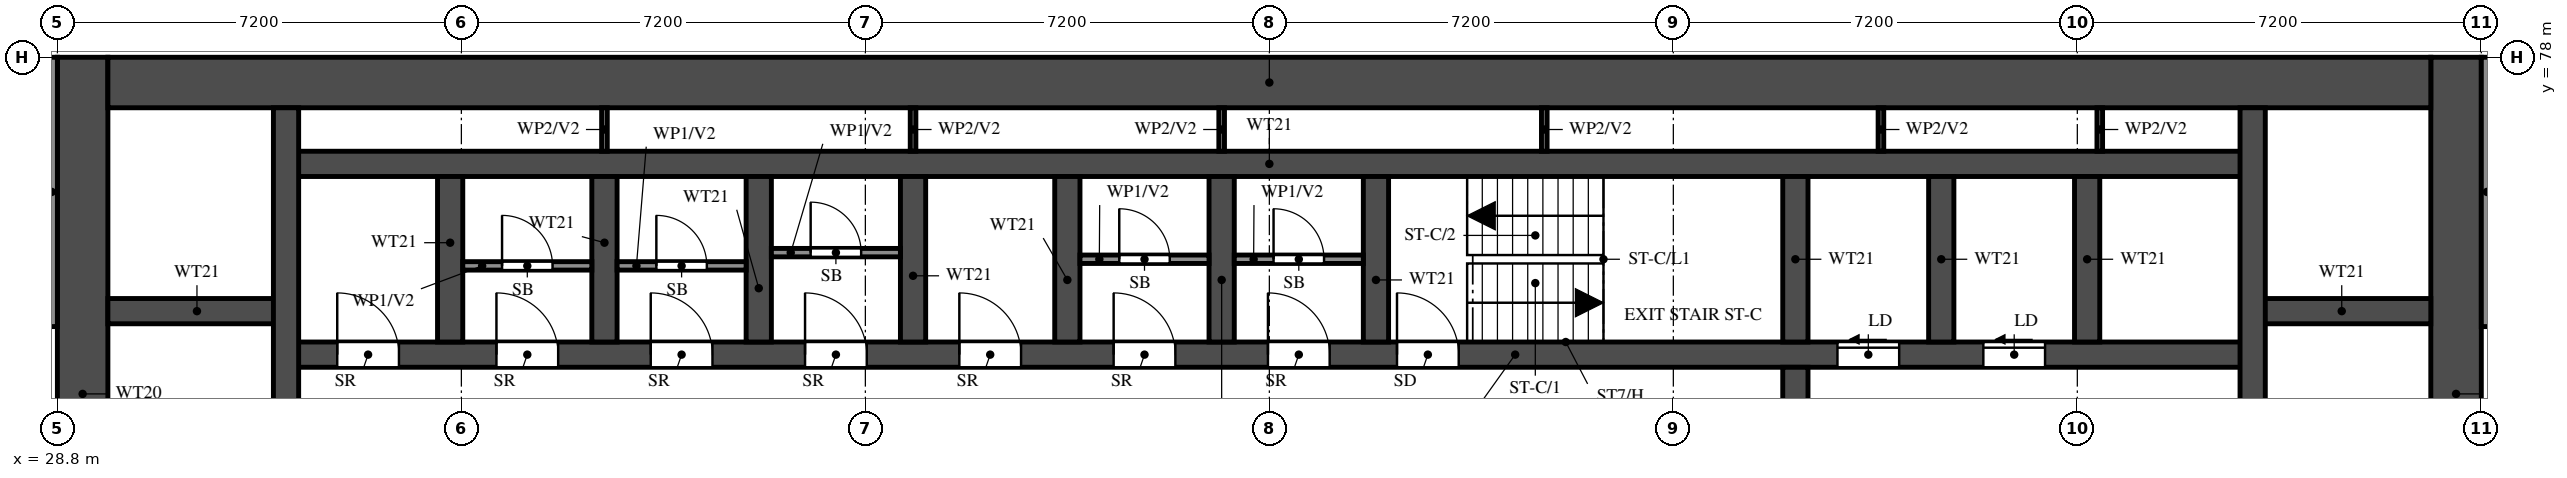
"""IFC4 building model, lengths in metres.
Left out: names, types, materials, properties, quantities, classifications, styles, units other than length and angle.
Written with IfcOpenShell. Run it as: python <this file> out.ifc"""

import sys

from ifc_helpers import new_model, si_unit, direction, frame, frame_2d, origin, place, context, subcontext, project, spatial, rectangle, extrude, element, fill, save


model = new_model("IFC4")
c1 = context("Model", 3, precision=1e-05, world=origin(), true_north=direction((0.0, 1.0)))
c2 = subcontext(c1, "Body", "Model", "MODEL_VIEW")
j1 = project(units=[si_unit("LENGTHUNIT", "METRE"), si_unit("PLANEANGLEUNIT", "RADIAN")], contexts=[c1])
p1 = place(None, origin())
s1 = spatial("IfcSite", under=j1, at=p1, CompositionType="ELEMENT")
p2 = place(p1, origin())
s2 = spatial("IfcBuilding", under=s1, at=p2, CompositionType="ELEMENT")
p3 = place(p2, frame((0.0, 0.0, 58.5)))
s3 = spatial("IfcBuildingStorey", under=s2, at=p3, CompositionType="ELEMENT", Elevation=58.5)
for number, where, z_axis, x_axis in (
    (1, (29.25, 66.0, 0.0), (0.0, 0.0, 1.0), (0.0, 1.0, 0.0)),
    (2, (71.55, 66.0, 0.0), (0.0, 0.0, 1.0), (0.0, 1.0, 0.0)),
):
    element("IfcWall", number, at=place(p3, frame(where, z_axis=z_axis, x_axis=x_axis)), inside=s3, PredefinedType="SHEAR", context=c2, shape_type="SweptSolid", body=[
        extrude(rectangle(XDim=12.0, YDim=0.9, at=frame_2d((6.0, 0.0))), origin(), (0.0, 0.0, 1.0), 3.18),
    ])
p4 = place(p3, frame((29.7, 77.55, 0.0), z_axis=(0.0, 0.0, 1.0), x_axis=(1.0, 0.0, 0.0)))
e3 = element("IfcWall", 3, at=p4, inside=s3, PredefinedType="SHEAR", context=c2, shape_type="SweptSolid", body=[
    extrude(rectangle(XDim=41.4, YDim=0.9, at=frame_2d((20.7, 0.0))), origin(), (0.0, 0.0, 1.0), 3.18),
])
p5 = place(p3, frame((32.875, 72.7, 0.0), z_axis=(0.0, 0.0, 1.0), x_axis=(1.0, 0.0, 0.0)))
e4 = element("IfcWall", 4, at=p5, inside=s3, PredefinedType="SHEAR", context=c2, shape_type="SweptSolid", body=[
    extrude(rectangle(XDim=35.05, YDim=0.45, at=frame_2d((17.525, 0.0))), origin(), (0.0, 0.0, 1.0), 3.18),
])
p6 = place(p5, frame((19.8, 0.0, 0.0)))
e5 = element("IfcOpeningElement", 5, at=p6, cuts=e4, PredefinedType="OPENING", context=c2, shape_type="SweptSolid", body=[
    extrude(rectangle(XDim=1.1, YDim=2.1, at=frame_2d((0.55, 1.05))), frame((0.0, 0.235, 0.0), z_axis=(0.0, -1.0, 0.0), x_axis=(1.0, 0.0, 0.0)), (0.0, 0.0, 1.0), 0.47),
])
p7 = place(p5, frame((27.65, 0.0, 0.0)))
e6 = element("IfcOpeningElement", 6, at=p7, cuts=e4, PredefinedType="OPENING", context=c2, shape_type="SweptSolid", body=[
    extrude(rectangle(XDim=1.1, YDim=2.1, at=frame_2d((0.55, 1.05))), frame((0.0, 0.235, 0.0), z_axis=(0.0, -1.0, 0.0), x_axis=(1.0, 0.0, 0.0)), (0.0, 0.0, 1.0), 0.47),
])
p8 = place(p5, frame((30.25, 0.0, 0.0)))
e7 = element("IfcOpeningElement", 7, at=p8, cuts=e4, PredefinedType="OPENING", context=c2, shape_type="SweptSolid", body=[
    extrude(rectangle(XDim=1.1, YDim=2.1, at=frame_2d((0.55, 1.05))), frame((0.0, 0.235, 0.0), z_axis=(0.0, -1.0, 0.0), x_axis=(1.0, 0.0, 0.0)), (0.0, 0.0, 1.0), 0.47),
])
p9 = place(p5, frame((3.75, 0.0, 0.0)))
e8 = element("IfcOpeningElement", 8, at=p9, cuts=e4, PredefinedType="OPENING", context=c2, shape_type="SweptSolid", body=[
    extrude(rectangle(XDim=1.1, YDim=2.1, at=frame_2d((0.55, 1.05))), frame((0.0, 0.235, 0.0), z_axis=(0.0, -1.0, 0.0), x_axis=(1.0, 0.0, 0.0)), (0.0, 0.0, 1.0), 0.47),
])
p10 = place(p5, frame((6.5, 0.0, 0.0)))
e9 = element("IfcOpeningElement", 9, at=p10, cuts=e4, PredefinedType="OPENING", context=c2, shape_type="SweptSolid", body=[
    extrude(rectangle(XDim=1.1, YDim=2.1, at=frame_2d((0.55, 1.05))), frame((0.0, 0.235, 0.0), z_axis=(0.0, -1.0, 0.0), x_axis=(1.0, 0.0, 0.0)), (0.0, 0.0, 1.0), 0.47),
])
p11 = place(p5, frame((9.25, 0.0, 0.0)))
e10 = element("IfcOpeningElement", 10, at=p11, cuts=e4, PredefinedType="OPENING", context=c2, shape_type="SweptSolid", body=[
    extrude(rectangle(XDim=1.1, YDim=2.1, at=frame_2d((0.55, 1.05))), frame((0.0, 0.235, 0.0), z_axis=(0.0, -1.0, 0.0), x_axis=(1.0, 0.0, 0.0)), (0.0, 0.0, 1.0), 0.47),
])
p12 = place(p5, frame((12.0, 0.0, 0.0)))
e11 = element("IfcOpeningElement", 11, at=p12, cuts=e4, PredefinedType="OPENING", context=c2, shape_type="SweptSolid", body=[
    extrude(rectangle(XDim=1.1, YDim=2.1, at=frame_2d((0.55, 1.05))), frame((0.0, 0.235, 0.0), z_axis=(0.0, -1.0, 0.0), x_axis=(1.0, 0.0, 0.0)), (0.0, 0.0, 1.0), 0.47),
])
p13 = place(p5, frame((14.75, 0.0, 0.0)))
e12 = element("IfcOpeningElement", 12, at=p13, cuts=e4, PredefinedType="OPENING", context=c2, shape_type="SweptSolid", body=[
    extrude(rectangle(XDim=1.1, YDim=2.1, at=frame_2d((0.55, 1.05))), frame((0.0, 0.235, 0.0), z_axis=(0.0, -1.0, 0.0), x_axis=(1.0, 0.0, 0.0)), (0.0, 0.0, 1.0), 0.47),
])
p14 = place(p5, frame((17.5, 0.0, 0.0)))
e13 = element("IfcOpeningElement", 13, at=p14, cuts=e4, PredefinedType="OPENING", context=c2, shape_type="SweptSolid", body=[
    extrude(rectangle(XDim=1.1, YDim=2.1, at=frame_2d((0.55, 1.05))), frame((0.0, 0.235, 0.0), z_axis=(0.0, -1.0, 0.0), x_axis=(1.0, 0.0, 0.0)), (0.0, 0.0, 1.0), 0.47),
])
p15 = place(p5, frame((0.913, 0.0, 0.0)))
e14 = element("IfcOpeningElement", 14, at=p15, cuts=e4, PredefinedType="OPENING", context=c2, shape_type="SweptSolid", body=[
    extrude(rectangle(XDim=1.1, YDim=2.1, at=frame_2d((0.55, 1.05))), frame((0.0, 0.235, 0.0), z_axis=(0.0, -1.0, 0.0), x_axis=(1.0, 0.0, 0.0)), (0.0, 0.0, 1.0), 0.47),
])
p16 = place(p3, frame((32.875, 76.1, 0.0), z_axis=(0.0, 0.0, 1.0), x_axis=(1.0, 0.0, 0.0)))
e15 = element("IfcWall", 15, at=p16, inside=s3, PredefinedType="SHEAR", context=c2, shape_type="SweptSolid", body=[
    extrude(rectangle(XDim=35.05, YDim=0.45, at=frame_2d((17.525, 0.0))), origin(), (0.0, 0.0, 1.0), 3.18),
])
for number, where, z_axis, x_axis in (
    (16, (29.7, 73.475, 0.0), (0.0, 0.0, 1.0), (1.0, 0.0, 0.0)),
    (17, (67.925, 73.475, 0.0), (0.0, 0.0, 1.0), (1.0, 0.0, 0.0)),
):
    element("IfcWall", number, at=place(p3, frame(where, z_axis=z_axis, x_axis=x_axis)), inside=s3, PredefinedType="SHEAR", context=c2, shape_type="SweptSolid", body=[
        extrude(rectangle(XDim=3.175, YDim=0.45, at=frame_2d((1.587, 0.0))), origin(), (0.0, 0.0, 1.0), 3.18),
    ])
p17 = place(p3, frame((32.875, 66.45, 0.0), z_axis=(0.0, 0.0, 1.0), x_axis=(0.0, 1.0, 0.0)))
e18 = element("IfcWall", 18, at=p17, inside=s3, PredefinedType="SHEAR", context=c2, shape_type="SweptSolid", body=[
    extrude(rectangle(XDim=10.65, YDim=0.45, at=frame_2d((5.325, 0.0))), origin(), (0.0, 0.0, 1.0), 3.18),
])
p18 = place(p3, frame((67.925, 66.45, 0.0), z_axis=(0.0, 0.0, 1.0), x_axis=(0.0, 1.0, 0.0)))
e19 = element("IfcWall", 19, at=p18, inside=s3, PredefinedType="SHEAR", context=c2, shape_type="SweptSolid", body=[
    extrude(rectangle(XDim=10.65, YDim=0.45, at=frame_2d((5.325, 0.0))), origin(), (0.0, 0.0, 1.0), 3.18),
])
p19 = place(p18, frame((0.15, 0.0, 0.0)))
e20 = element("IfcOpeningElement", 20, at=p19, cuts=e19, PredefinedType="OPENING", context=c2, shape_type="SweptSolid", body=[
    extrude(rectangle(XDim=1.1, YDim=2.1, at=frame_2d((0.55, 1.05))), frame((0.0, 0.235, 0.0), z_axis=(0.0, -1.0, 0.0), x_axis=(1.0, 0.0, 0.0)), (0.0, 0.0, 1.0), 0.47),
])
p20 = place(p3, frame((59.775, 66.45, 0.0), z_axis=(0.0, 0.0, 1.0), x_axis=(0.0, 1.0, 0.0)))
e21 = element("IfcWall", 21, at=p20, inside=s3, PredefinedType="SHEAR", context=c2, shape_type="SweptSolid", body=[
    extrude(rectangle(XDim=6.025, YDim=0.45, at=frame_2d((3.013, 0.0))), origin(), (0.0, 0.0, 1.0), 3.18),
])
p21 = place(p20, frame((3.85, 0.0, 0.0)))
e22 = element("IfcOpeningElement", 22, at=p21, cuts=e21, PredefinedType="OPENING", context=c2, shape_type="SweptSolid", body=[
    extrude(rectangle(XDim=1.2, YDim=2.1, at=frame_2d((0.6, 1.05))), frame((0.0, 0.235, 0.0), z_axis=(0.0, -1.0, 0.0), x_axis=(1.0, 0.0, 0.0)), (0.0, 0.0, 1.0), 0.47),
])
for number, where, z_axis, x_axis in (
    (23, (59.775, 72.925, 0.0), (0.0, 0.0, 1.0), (0.0, 1.0, 0.0)),
    (24, (35.8, 72.925, 0.0), (0.0, 0.0, 1.0), (0.0, 1.0, 0.0)),
    (25, (38.55, 72.925, 0.0), (0.0, 0.0, 1.0), (0.0, 1.0, 0.0)),
    (26, (41.3, 72.925, 0.0), (0.0, 0.0, 1.0), (0.0, 1.0, 0.0)),
    (27, (44.05, 72.925, 0.0), (0.0, 0.0, 1.0), (0.0, 1.0, 0.0)),
    (28, (46.8, 72.925, 0.0), (0.0, 0.0, 1.0), (0.0, 1.0, 0.0)),
    (29, (49.55, 72.925, 0.0), (0.0, 0.0, 1.0), (0.0, 1.0, 0.0)),
    (30, (52.3, 72.925, 0.0), (0.0, 0.0, 1.0), (0.0, 1.0, 0.0)),
    (31, (62.375, 72.925, 0.0), (0.0, 0.0, 1.0), (0.0, 1.0, 0.0)),
    (32, (64.975, 72.925, 0.0), (0.0, 0.0, 1.0), (0.0, 1.0, 0.0)),
):
    element("IfcWall", number, at=place(p3, frame(where, z_axis=z_axis, x_axis=x_axis)), inside=s3, PredefinedType="SHEAR", context=c2, shape_type="SweptSolid", body=[
        extrude(rectangle(XDim=2.95, YDim=0.45, at=frame_2d((1.475, 0.0))), origin(), (0.0, 0.0, 1.0), 3.18),
    ])
p22 = place(p3, frame((36.025, 74.282, 0.0), z_axis=(0.0, 0.0, 1.0), x_axis=(1.0, 0.0, 0.0)))
e33 = element("IfcWall", 33, at=p22, inside=s3, PredefinedType="PARTITIONING", context=c2, shape_type="SweptSolid", body=[
    extrude(rectangle(XDim=2.3, YDim=0.15, at=frame_2d((1.15, 0.0))), origin(), (0.0, 0.0, 1.0), 3.18),
])
p23 = place(p22, frame((0.7, 0.0, 0.0)))
e34 = element("IfcOpeningElement", 34, at=p23, cuts=e33, PredefinedType="OPENING", context=c2, shape_type="SweptSolid", body=[
    extrude(rectangle(XDim=0.9, YDim=2.1, at=frame_2d((0.45, 1.05))), frame((0.0, 0.085, 0.0), z_axis=(0.0, -1.0, 0.0), x_axis=(1.0, 0.0, 0.0)), (0.0, 0.0, 1.0), 0.17),
])
p24 = place(p3, frame((38.775, 74.282, 0.0), z_axis=(0.0, 0.0, 1.0), x_axis=(1.0, 0.0, 0.0)))
e35 = element("IfcWall", 35, at=p24, inside=s3, PredefinedType="PARTITIONING", context=c2, shape_type="SweptSolid", body=[
    extrude(rectangle(XDim=2.3, YDim=0.15, at=frame_2d((1.15, 0.0))), origin(), (0.0, 0.0, 1.0), 3.18),
])
p25 = place(p24, frame((0.7, 0.0, 0.0)))
e36 = element("IfcOpeningElement", 36, at=p25, cuts=e35, PredefinedType="OPENING", context=c2, shape_type="SweptSolid", body=[
    extrude(rectangle(XDim=0.9, YDim=2.1, at=frame_2d((0.45, 1.05))), frame((0.0, 0.085, 0.0), z_axis=(0.0, -1.0, 0.0), x_axis=(1.0, 0.0, 0.0)), (0.0, 0.0, 1.0), 0.17),
])
p26 = place(p3, frame((41.525, 74.518, 0.0), z_axis=(0.0, 0.0, 1.0), x_axis=(1.0, 0.0, 0.0)))
e37 = element("IfcWall", 37, at=p26, inside=s3, PredefinedType="PARTITIONING", context=c2, shape_type="SweptSolid", body=[
    extrude(rectangle(XDim=2.3, YDim=0.15, at=frame_2d((1.15, 0.0))), origin(), (0.0, 0.0, 1.0), 3.18),
])
p27 = place(p26, frame((0.7, 0.0, 0.0)))
e38 = element("IfcOpeningElement", 38, at=p27, cuts=e37, PredefinedType="OPENING", context=c2, shape_type="SweptSolid", body=[
    extrude(rectangle(XDim=0.9, YDim=2.1, at=frame_2d((0.45, 1.05))), frame((0.0, 0.085, 0.0), z_axis=(0.0, -1.0, 0.0), x_axis=(1.0, 0.0, 0.0)), (0.0, 0.0, 1.0), 0.17),
])
p28 = place(p3, frame((47.025, 74.4, 0.0), z_axis=(0.0, 0.0, 1.0), x_axis=(1.0, 0.0, 0.0)))
e39 = element("IfcWall", 39, at=p28, inside=s3, PredefinedType="PARTITIONING", context=c2, shape_type="SweptSolid", body=[
    extrude(rectangle(XDim=2.3, YDim=0.15, at=frame_2d((1.15, 0.0))), origin(), (0.0, 0.0, 1.0), 3.18),
])
p29 = place(p28, frame((0.7, 0.0, 0.0)))
e40 = element("IfcOpeningElement", 40, at=p29, cuts=e39, PredefinedType="OPENING", context=c2, shape_type="SweptSolid", body=[
    extrude(rectangle(XDim=0.9, YDim=2.1, at=frame_2d((0.45, 1.05))), frame((0.0, 0.085, 0.0), z_axis=(0.0, -1.0, 0.0), x_axis=(1.0, 0.0, 0.0)), (0.0, 0.0, 1.0), 0.17),
])
p30 = place(p3, frame((49.775, 74.4, 0.0), z_axis=(0.0, 0.0, 1.0), x_axis=(1.0, 0.0, 0.0)))
e41 = element("IfcWall", 41, at=p30, inside=s3, PredefinedType="PARTITIONING", context=c2, shape_type="SweptSolid", body=[
    extrude(rectangle(XDim=2.3, YDim=0.15, at=frame_2d((1.15, 0.0))), origin(), (0.0, 0.0, 1.0), 3.18),
])
p31 = place(p30, frame((0.7, 0.0, 0.0)))
e42 = element("IfcOpeningElement", 42, at=p31, cuts=e41, PredefinedType="OPENING", context=c2, shape_type="SweptSolid", body=[
    extrude(rectangle(XDim=0.9, YDim=2.1, at=frame_2d((0.45, 1.05))), frame((0.0, 0.085, 0.0), z_axis=(0.0, -1.0, 0.0), x_axis=(1.0, 0.0, 0.0)), (0.0, 0.0, 1.0), 0.17),
])
for number, where, z_axis, x_axis in (
    (43, (38.55, 76.325, 0.0), (0.0, 0.0, 1.0), (0.0, 1.0, 0.0)),
    (44, (44.05, 76.325, 0.0), (0.0, 0.0, 1.0), (0.0, 1.0, 0.0)),
    (45, (49.55, 76.325, 0.0), (0.0, 0.0, 1.0), (0.0, 1.0, 0.0)),
    (46, (55.3, 76.325, 0.0), (0.0, 0.0, 1.0), (0.0, 1.0, 0.0)),
    (47, (61.3, 76.325, 0.0), (0.0, 0.0, 1.0), (0.0, 1.0, 0.0)),
    (48, (65.2, 76.325, 0.0), (0.0, 0.0, 1.0), (0.0, 1.0, 0.0)),
):
    element("IfcWall", number, at=place(p3, frame(where, z_axis=z_axis, x_axis=x_axis)), inside=s3, PredefinedType="PARTITIONING", context=c2, shape_type="SweptSolid", body=[
        extrude(rectangle(XDim=0.775, YDim=0.1, at=frame_2d((0.388, 0.0))), origin(), (0.0, 0.0, 1.0), 3.18),
    ])
for number, where, z_axis, x_axis in (
    (49, (28.7, 73.2, 0.0), (0.0, 0.0, 1.0), (0.0, 1.0, 0.0)),
    (50, (72.1, 73.2, 0.0), (0.0, 0.0, 1.0), (0.0, 1.0, 0.0)),
):
    element("IfcWall", number, at=place(p3, frame(where, z_axis=z_axis, x_axis=x_axis)), inside=s3, PredefinedType="SOLIDWALL", context=c2, shape_type="SweptSolid", body=[
        extrude(rectangle(XDim=4.8, YDim=0.2, at=frame_2d((2.4, 0.0))), origin(), (0.0, 0.0, 1.0), 3.18),
    ])
p32 = place(p6, origin())
e51 = element("IfcDoor", 51, at=p32, inside=s3, OperationType="SINGLE_SWING_LEFT", PredefinedType="DOOR", context=c2, shape_type="SweptSolid", body=[
    extrude(rectangle(XDim=1.1, YDim=2.1, at=frame_2d((0.55, 1.05))), frame((0.0, 0.025, 0.0), z_axis=(0.0, -1.0, 0.0), x_axis=(1.0, 0.0, 0.0)), (0.0, 0.0, 1.0), 0.05),
])
fill(e5, e51)
p33 = place(p7, origin())
e52 = element("IfcDoor", 52, at=p33, inside=s3, OperationType="SLIDING_TO_LEFT", PredefinedType="DOOR", context=c2, shape_type="SweptSolid", body=[
    extrude(rectangle(XDim=1.1, YDim=2.1, at=frame_2d((0.55, 1.05))), frame((0.0, 0.025, 0.0), z_axis=(0.0, -1.0, 0.0), x_axis=(1.0, 0.0, 0.0)), (0.0, 0.0, 1.0), 0.05),
])
fill(e6, e52)
p34 = place(p8, origin())
e53 = element("IfcDoor", 53, at=p34, inside=s3, OperationType="SLIDING_TO_LEFT", PredefinedType="DOOR", context=c2, shape_type="SweptSolid", body=[
    extrude(rectangle(XDim=1.1, YDim=2.1, at=frame_2d((0.55, 1.05))), frame((0.0, 0.025, 0.0), z_axis=(0.0, -1.0, 0.0), x_axis=(1.0, 0.0, 0.0)), (0.0, 0.0, 1.0), 0.05),
])
fill(e7, e53)
p35 = place(p9, origin())
e54 = element("IfcDoor", 54, at=p35, inside=s3, OperationType="SINGLE_SWING_LEFT", PredefinedType="DOOR", context=c2, shape_type="SweptSolid", body=[
    extrude(rectangle(XDim=1.1, YDim=2.1, at=frame_2d((0.55, 1.05))), frame((0.0, 0.025, 0.0), z_axis=(0.0, -1.0, 0.0), x_axis=(1.0, 0.0, 0.0)), (0.0, 0.0, 1.0), 0.05),
])
fill(e8, e54)
p36 = place(p23, origin())
e55 = element("IfcDoor", 55, at=p36, inside=s3, OperationType="SINGLE_SWING_LEFT", PredefinedType="DOOR", context=c2, shape_type="SweptSolid", body=[
    extrude(rectangle(XDim=0.9, YDim=2.1, at=frame_2d((0.45, 1.05))), frame((0.0, 0.025, 0.0), z_axis=(0.0, -1.0, 0.0), x_axis=(1.0, 0.0, 0.0)), (0.0, 0.0, 1.0), 0.05),
])
fill(e34, e55)
p37 = place(p10, origin())
e56 = element("IfcDoor", 56, at=p37, inside=s3, OperationType="SINGLE_SWING_LEFT", PredefinedType="DOOR", context=c2, shape_type="SweptSolid", body=[
    extrude(rectangle(XDim=1.1, YDim=2.1, at=frame_2d((0.55, 1.05))), frame((0.0, 0.025, 0.0), z_axis=(0.0, -1.0, 0.0), x_axis=(1.0, 0.0, 0.0)), (0.0, 0.0, 1.0), 0.05),
])
fill(e9, e56)
p38 = place(p25, origin())
e57 = element("IfcDoor", 57, at=p38, inside=s3, OperationType="SINGLE_SWING_RIGHT", PredefinedType="DOOR", context=c2, shape_type="SweptSolid", body=[
    extrude(rectangle(XDim=0.9, YDim=2.1, at=frame_2d((0.45, 1.05))), frame((0.0, 0.025, 0.0), z_axis=(0.0, -1.0, 0.0), x_axis=(1.0, 0.0, 0.0)), (0.0, 0.0, 1.0), 0.05),
])
fill(e36, e57)
p39 = place(p11, origin())
e58 = element("IfcDoor", 58, at=p39, inside=s3, OperationType="SINGLE_SWING_LEFT", PredefinedType="DOOR", context=c2, shape_type="SweptSolid", body=[
    extrude(rectangle(XDim=1.1, YDim=2.1, at=frame_2d((0.55, 1.05))), frame((0.0, 0.025, 0.0), z_axis=(0.0, -1.0, 0.0), x_axis=(1.0, 0.0, 0.0)), (0.0, 0.0, 1.0), 0.05),
])
fill(e10, e58)
p40 = place(p27, origin())
e59 = element("IfcDoor", 59, at=p40, inside=s3, OperationType="SINGLE_SWING_RIGHT", PredefinedType="DOOR", context=c2, shape_type="SweptSolid", body=[
    extrude(rectangle(XDim=0.9, YDim=2.1, at=frame_2d((0.45, 1.05))), frame((0.0, 0.025, 0.0), z_axis=(0.0, -1.0, 0.0), x_axis=(1.0, 0.0, 0.0)), (0.0, 0.0, 1.0), 0.05),
])
fill(e38, e59)
p41 = place(p12, origin())
e60 = element("IfcDoor", 60, at=p41, inside=s3, OperationType="SINGLE_SWING_LEFT", PredefinedType="DOOR", context=c2, shape_type="SweptSolid", body=[
    extrude(rectangle(XDim=1.1, YDim=2.1, at=frame_2d((0.55, 1.05))), frame((0.0, 0.025, 0.0), z_axis=(0.0, -1.0, 0.0), x_axis=(1.0, 0.0, 0.0)), (0.0, 0.0, 1.0), 0.05),
])
fill(e11, e60)
p42 = place(p13, origin())
e61 = element("IfcDoor", 61, at=p42, inside=s3, OperationType="SINGLE_SWING_LEFT", PredefinedType="DOOR", context=c2, shape_type="SweptSolid", body=[
    extrude(rectangle(XDim=1.1, YDim=2.1, at=frame_2d((0.55, 1.05))), frame((0.0, 0.025, 0.0), z_axis=(0.0, -1.0, 0.0), x_axis=(1.0, 0.0, 0.0)), (0.0, 0.0, 1.0), 0.05),
])
fill(e12, e61)
p43 = place(p29, origin())
e62 = element("IfcDoor", 62, at=p43, inside=s3, OperationType="SINGLE_SWING_LEFT", PredefinedType="DOOR", context=c2, shape_type="SweptSolid", body=[
    extrude(rectangle(XDim=0.9, YDim=2.1, at=frame_2d((0.45, 1.05))), frame((0.0, 0.025, 0.0), z_axis=(0.0, -1.0, 0.0), x_axis=(1.0, 0.0, 0.0)), (0.0, 0.0, 1.0), 0.05),
])
fill(e40, e62)
p44 = place(p14, origin())
e63 = element("IfcDoor", 63, at=p44, inside=s3, OperationType="SINGLE_SWING_LEFT", PredefinedType="DOOR", context=c2, shape_type="SweptSolid", body=[
    extrude(rectangle(XDim=1.1, YDim=2.1, at=frame_2d((0.55, 1.05))), frame((0.0, 0.025, 0.0), z_axis=(0.0, -1.0, 0.0), x_axis=(1.0, 0.0, 0.0)), (0.0, 0.0, 1.0), 0.05),
])
fill(e13, e63)
p45 = place(p31, origin())
e64 = element("IfcDoor", 64, at=p45, inside=s3, OperationType="SINGLE_SWING_RIGHT", PredefinedType="DOOR", context=c2, shape_type="SweptSolid", body=[
    extrude(rectangle(XDim=0.9, YDim=2.1, at=frame_2d((0.45, 1.05))), frame((0.0, 0.025, 0.0), z_axis=(0.0, -1.0, 0.0), x_axis=(1.0, 0.0, 0.0)), (0.0, 0.0, 1.0), 0.05),
])
fill(e42, e64)
p46 = place(p15, origin())
e65 = element("IfcDoor", 65, at=p46, inside=s3, OperationType="SINGLE_SWING_LEFT", PredefinedType="DOOR", context=c2, shape_type="SweptSolid", body=[
    extrude(rectangle(XDim=1.1, YDim=2.1, at=frame_2d((0.55, 1.05))), frame((0.0, 0.025, 0.0), z_axis=(0.0, -1.0, 0.0), x_axis=(1.0, 0.0, 0.0)), (0.0, 0.0, 1.0), 0.05),
])
fill(e14, e65)
save(model, sys.argv[1])
